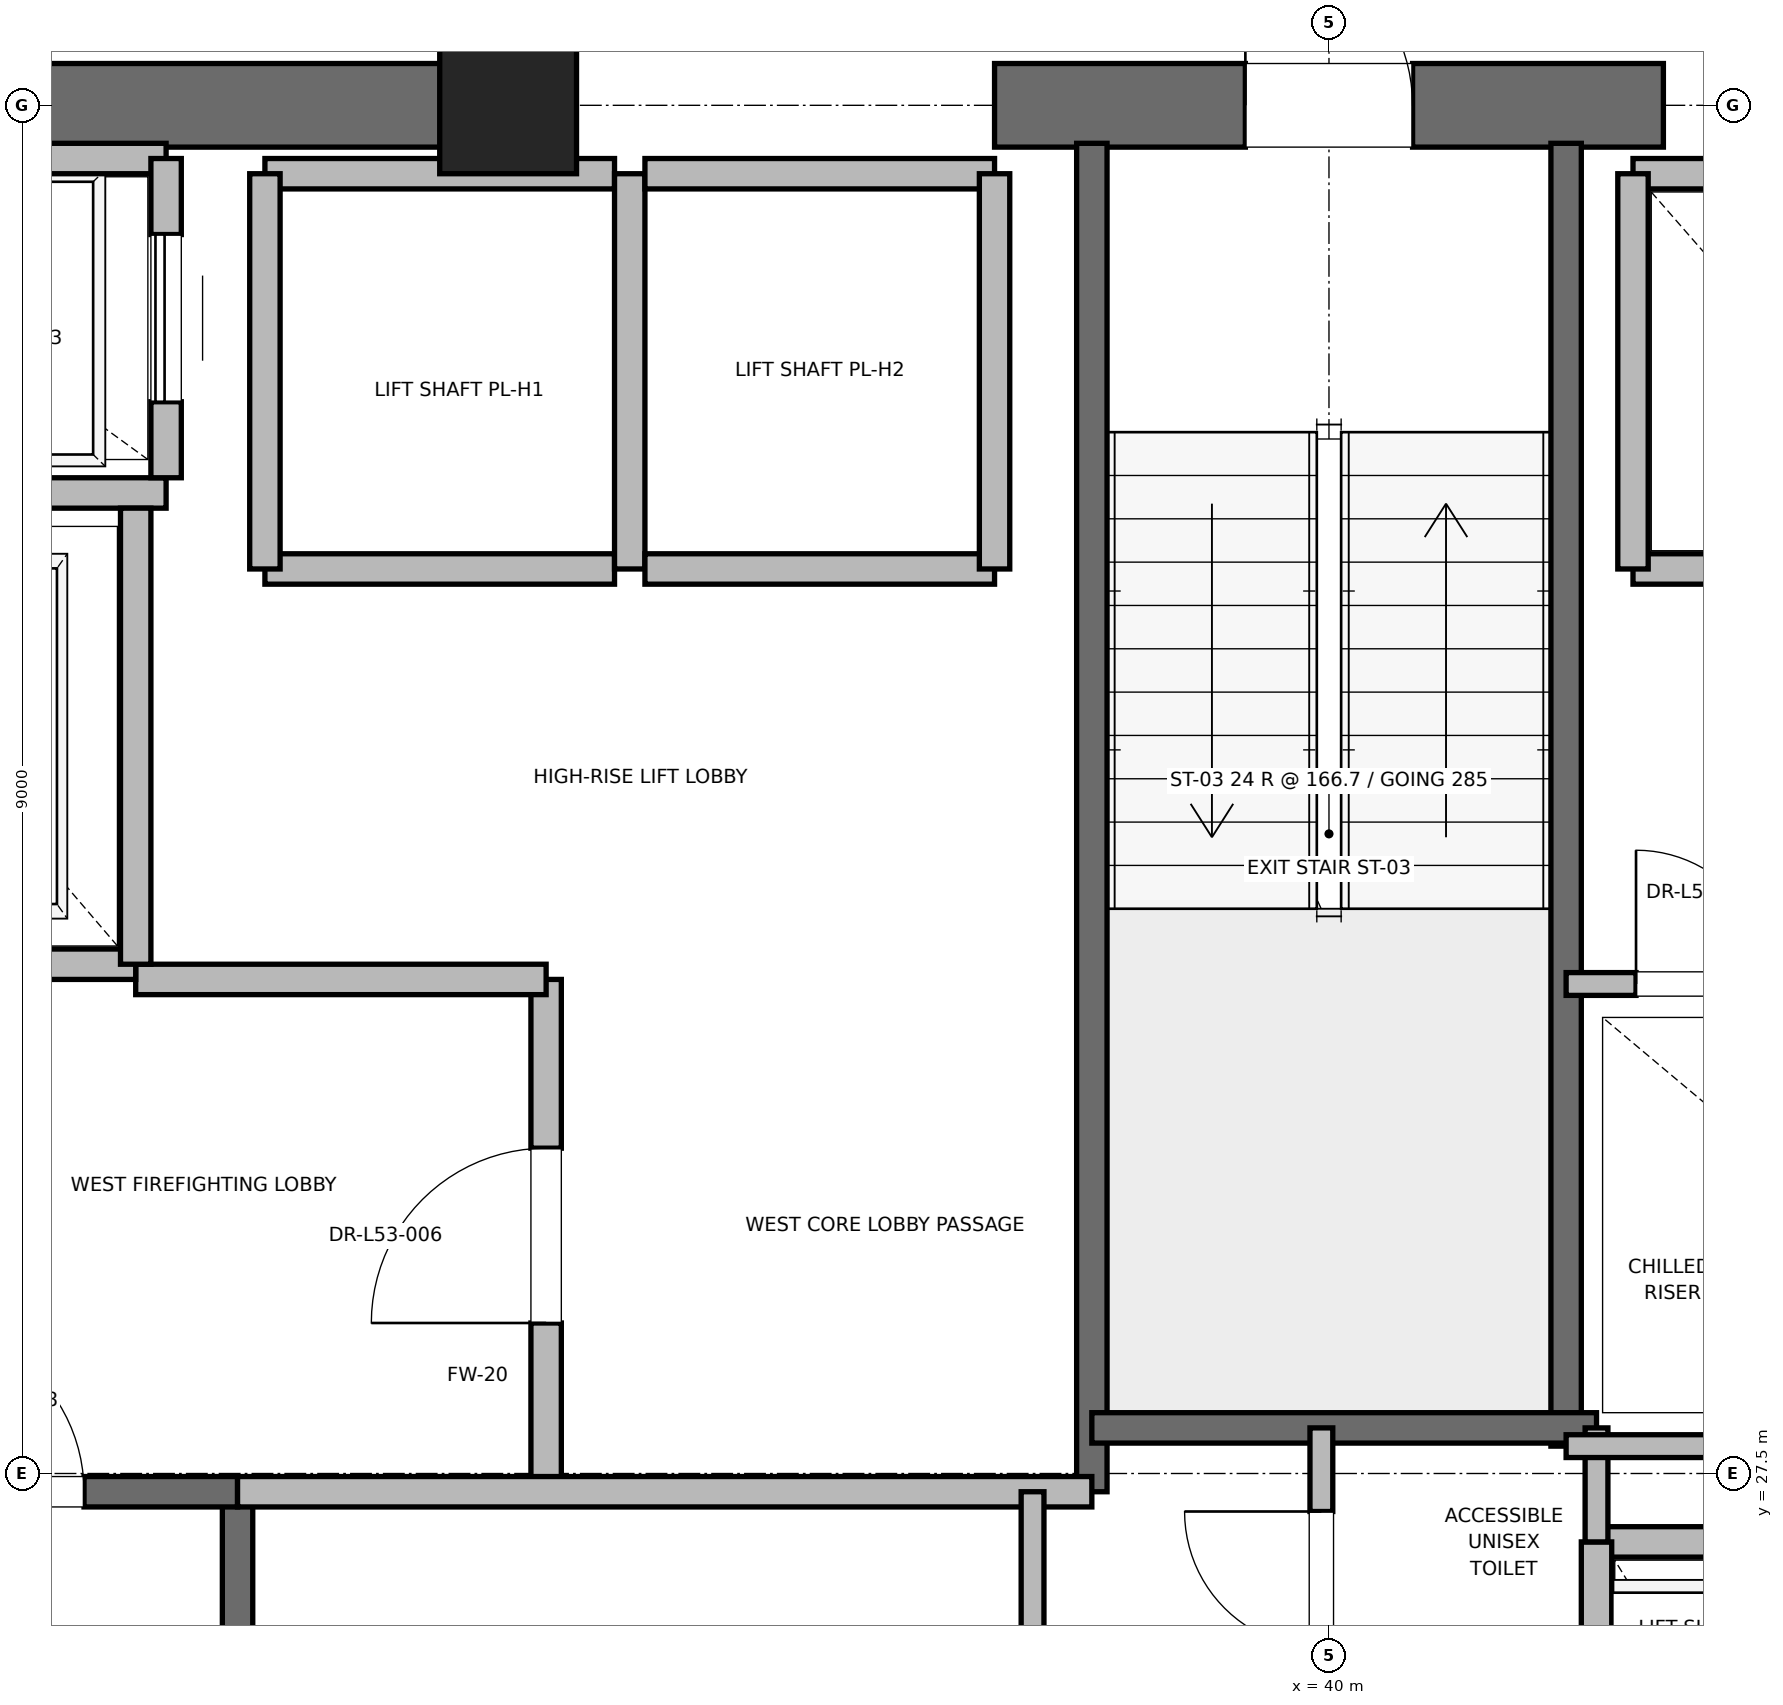
"""IFC4 building model, lengths in metres.
Left out: names, types, materials, properties, quantities, classifications, styles, units other than length and angle.
Written with IfcOpenShell. Run it as: python <this file> out.ifc"""

import sys

from ifc_helpers import new_model, si_unit, direction, frame, frame_2d, origin, origin_2d, place, context, subcontext, project, spatial, rectangle, extrude, element, fill, save


model = new_model("IFC4")
c1 = context("Model", 3, precision=1e-05, world=origin(), true_north=direction((0.0, 1.0)))
c2 = subcontext(c1, "Body", "Model", "MODEL_VIEW")
j1 = project(units=[si_unit("LENGTHUNIT", "METRE"), si_unit("PLANEANGLEUNIT", "RADIAN")], contexts=[c1])
p1 = place(None, origin())
s1 = spatial("IfcSite", under=j1, at=p1, CompositionType="ELEMENT")
p2 = place(p1, origin())
s2 = spatial("IfcBuilding", under=s1, at=p2, CompositionType="ELEMENT")
p3 = place(p2, frame((0.0, 0.0, 229.2)))
s3 = spatial("IfcBuildingStorey", under=s2, at=p3, CompositionType="ELEMENT", Elevation=229.2)
p4 = place(p3, frame((34.6, 36.5, 0.0), z_axis=(0.0, 0.0, 1.0), x_axis=(1.0, 0.0, 0.0)))
e1 = element("IfcColumn", 1, at=p4, inside=s3, PredefinedType="PILASTER", context=c2, shape_type="SweptSolid", body=[
    extrude(rectangle(XDim=0.9, YDim=0.9, at=origin_2d()), origin(), (0.0, 0.0, 1.0), 4.0),
])
p5 = place(p3, frame((29.0, 36.5, 0.0), z_axis=(0.0, 0.0, 1.0), x_axis=(1.0, 0.0, 0.0)))
e2 = element("IfcWall", 2, at=p5, inside=s3, PredefinedType="SHEAR", context=c2, shape_type="SweptSolid", body=[
    extrude(rectangle(XDim=5.8, YDim=0.55, at=frame_2d((2.9, 0.0))), origin(), (0.0, 0.0, 1.0), 3.7),
])
p6 = place(p3, frame((37.8, 36.5, 0.0), z_axis=(0.0, 0.0, 1.0), x_axis=(1.0, 0.0, 0.0)))
e3 = element("IfcWall", 3, at=p6, inside=s3, PredefinedType="SHEAR", context=c2, shape_type="SweptSolid", body=[
    extrude(rectangle(XDim=4.4, YDim=0.55, at=frame_2d((2.2, 0.0))), origin(), (0.0, 0.0, 1.0), 3.7),
])
p7 = place(p6, frame((1.65, 0.0, 0.0)))
e4 = element("IfcOpeningElement", 4, at=p7, cuts=e3, PredefinedType="OPENING", context=c2, shape_type="SweptSolid", body=[
    extrude(rectangle(XDim=1.1, YDim=2.15, at=frame_2d((0.55, 1.075))), frame((0.0, 0.275, 0.0), z_axis=(0.0, -1.0, 0.0), x_axis=(1.0, 0.0, 0.0)), (0.0, 0.0, 1.0), 0.55),
])
p8 = place(p3, frame((32.82, 18.6, 0.0), z_axis=(0.0, 0.0, 1.0), x_axis=(0.0, 1.0, 0.0)))
e5 = element("IfcWall", 5, at=p8, inside=s3, PredefinedType="SOLIDWALL", context=c2, shape_type="SweptSolid", body=[
    extrude(rectangle(XDim=8.78, YDim=0.2, at=frame_2d((4.39, 0.0))), origin(), (0.0, 0.0, 1.0), 3.7),
])
p9 = place(p3, frame((29.7, 27.38, 0.0), z_axis=(0.0, 0.0, 1.0), x_axis=(1.0, 0.0, 0.0)))
e6 = element("IfcWall", 6, at=p9, inside=s3, PredefinedType="SOLIDWALL", context=c2, shape_type="SweptSolid", body=[
    extrude(rectangle(XDim=3.12, YDim=0.2, at=frame_2d((1.56, 0.0))), origin(), (0.0, 0.0, 1.0), 3.7),
])
p10 = place(p9, frame((1.01, 0.0, 0.0)))
e7 = element("IfcOpeningElement", 7, at=p10, cuts=e6, PredefinedType="OPENING", context=c2, shape_type="SweptSolid", body=[
    extrude(rectangle(XDim=1.1, YDim=2.15, at=frame_2d((0.55, 1.075))), frame((0.0, 0.1, 0.0), z_axis=(0.0, -1.0, 0.0), x_axis=(1.0, 0.0, 0.0)), (0.0, 0.0, 1.0), 0.2),
])
p11 = place(p3, frame((38.44, 27.38, 0.0), z_axis=(0.0, 0.0, 1.0), x_axis=(0.0, 1.0, 0.0)))
e8 = element("IfcWall", 8, at=p11, inside=s3, PredefinedType="SOLIDWALL", context=c2, shape_type="SweptSolid", body=[
    extrude(rectangle(XDim=8.87, YDim=0.2, at=frame_2d((4.435, 0.0))), origin(), (0.0, 0.0, 1.0), 3.7),
])
p12 = place(p3, frame((41.56, 27.68, 0.0), z_axis=(0.0, 0.0, 1.0), x_axis=(0.0, 1.0, 0.0)))
e9 = element("IfcWall", 9, at=p12, inside=s3, PredefinedType="SOLIDWALL", context=c2, shape_type="SweptSolid", body=[
    extrude(rectangle(XDim=8.57, YDim=0.2, at=frame_2d((4.285, 0.0))), origin(), (0.0, 0.0, 1.0), 3.7),
])
p13 = place(p3, frame((38.44, 27.8, 0.0), z_axis=(0.0, 0.0, 1.0), x_axis=(1.0, 0.0, 0.0)))
e10 = element("IfcWall", 10, at=p13, inside=s3, PredefinedType="SOLIDWALL", context=c2, shape_type="SweptSolid", body=[
    extrude(rectangle(XDim=3.32, YDim=0.2, at=frame_2d((1.66, 0.0))), origin(), (0.0, 0.0, 1.0), 3.7),
])
p14 = place(p3, frame((34.85, 27.38, 0.0), z_axis=(0.0, 0.0, 1.0), x_axis=(0.0, 1.0, 0.0)))
e11 = element("IfcWall", 11, at=p14, inside=s3, PredefinedType="PARTITIONING", context=c2, shape_type="SweptSolid", body=[
    extrude(rectangle(XDim=3.37, YDim=0.2, at=frame_2d((1.685, 0.0))), origin(), (0.0, 0.0, 1.0), 3.7),
])
p15 = place(p14, frame((1.11, 0.0, 0.0)))
e12 = element("IfcOpeningElement", 12, at=p15, cuts=e11, PredefinedType="OPENING", context=c2, shape_type="SweptSolid", body=[
    extrude(rectangle(XDim=1.15, YDim=2.2, at=frame_2d((0.575, 1.1))), frame((0.0, 0.1, 0.0), z_axis=(0.0, -1.0, 0.0), x_axis=(1.0, 0.0, 0.0)), (0.0, 0.0, 1.0), 0.2),
])
p16 = place(p3, frame((32.82, 27.38, 0.0), z_axis=(0.0, 0.0, 1.0), x_axis=(1.0, 0.0, 0.0)))
e13 = element("IfcWall", 13, at=p16, inside=s3, PredefinedType="PARTITIONING", context=c2, shape_type="SweptSolid", body=[
    extrude(rectangle(XDim=5.62, YDim=0.2, at=frame_2d((2.81, 0.0))), origin(), (0.0, 0.0, 1.0), 3.7),
])
p17 = place(p3, frame((32.15, 30.75, 0.0), z_axis=(0.0, 0.0, 1.0), x_axis=(1.0, 0.0, 0.0)))
e14 = element("IfcWall", 14, at=p17, inside=s3, PredefinedType="PARTITIONING", context=c2, shape_type="SweptSolid", body=[
    extrude(rectangle(XDim=2.7, YDim=0.2, at=frame_2d((1.35, 0.0))), origin(), (0.0, 0.0, 1.0), 3.7),
])
p18 = place(p3, frame((29.55, 30.85, 0.0), z_axis=(0.0, 0.0, 1.0), x_axis=(1.0, 0.0, 0.0)))
e15 = element("IfcWall", 15, at=p18, inside=s3, PredefinedType="SOLIDWALL", context=c2, shape_type="SweptSolid", body=[
    extrude(rectangle(XDim=2.6, YDim=0.2, at=frame_2d((1.3, 0.0))), origin(), (0.0, 0.0, 1.0), 2.68),
])
p19 = place(p18, frame((0.75, 0.0, 0.0)))
e16 = element("IfcOpeningElement", 16, at=p19, cuts=e15, PredefinedType="OPENING", context=c2, shape_type="SweptSolid", body=[
    extrude(rectangle(XDim=1.1, YDim=2.2, at=frame_2d((0.55, 1.1))), frame((0.0, 0.1, 0.0), z_axis=(0.0, -1.0, 0.0), x_axis=(1.0, 0.0, 0.0)), (0.0, 0.0, 1.0), 0.2),
])
p20 = place(p3, frame((29.55, 33.95, 0.0), z_axis=(0.0, 0.0, 1.0), x_axis=(1.0, 0.0, 0.0)))
e17 = element("IfcWall", 17, at=p20, inside=s3, PredefinedType="SOLIDWALL", context=c2, shape_type="SweptSolid", body=[
    extrude(rectangle(XDim=2.8, YDim=0.2, at=frame_2d((1.4, 0.0))), origin(), (0.0, 0.0, 1.0), 3.7),
])
p21 = place(p3, frame((32.15, 30.85, 0.0), z_axis=(0.0, 0.0, 1.0), x_axis=(0.0, 1.0, 0.0)))
e18 = element("IfcWall", 18, at=p21, inside=s3, PredefinedType="SOLIDWALL", context=c2, shape_type="SweptSolid", body=[
    extrude(rectangle(XDim=3.0, YDim=0.2, at=frame_2d((1.5, 0.0))), origin(), (0.0, 0.0, 1.0), 3.7),
])
p22 = place(p3, frame((32.35, 36.15, 0.0), z_axis=(0.0, 0.0, 1.0), x_axis=(-1.0, 0.0, 0.0)))
e19 = element("IfcWall", 19, at=p22, inside=s3, PredefinedType="SOLIDWALL", context=c2, shape_type="SweptSolid", body=[
    extrude(rectangle(XDim=2.8, YDim=0.2, at=frame_2d((1.4, 0.0))), origin(), (0.0, 0.0, 1.0), 2.987),
])
p23 = place(p3, frame((32.35, 34.05, 0.0), z_axis=(0.0, 0.0, 1.0), x_axis=(0.0, 1.0, 0.0)))
e20 = element("IfcWall", 20, at=p23, inside=s3, PredefinedType="SOLIDWALL", context=c2, shape_type="SweptSolid", body=[
    extrude(rectangle(XDim=2.1, YDim=0.2, at=frame_2d((1.05, 0.0))), origin(), (0.0, 0.0, 1.0), 3.7),
])
p24 = place(p23, frame((0.5, 0.0, 0.0)))
e21 = element("IfcOpeningElement", 21, at=p24, cuts=e20, PredefinedType="OPENING", context=c2, shape_type="SweptSolid", body=[
    extrude(rectangle(XDim=1.1, YDim=2.2, at=frame_2d((0.55, 1.1))), frame((0.0, 0.1, 0.0), z_axis=(0.0, -1.0, 0.0), x_axis=(1.0, 0.0, 0.0)), (0.0, 0.0, 1.0), 0.2),
])
p25 = place(p3, frame((43.44, 27.05, 0.0), z_axis=(0.0, 0.0, 1.0), x_axis=(-1.0, 0.0, 0.0)))
e22 = element("IfcWall", 22, at=p25, inside=s3, PredefinedType="SOLIDWALL", context=c2, shape_type="SweptSolid", body=[
    extrude(rectangle(XDim=1.68, YDim=0.2, at=frame_2d((0.84, 0.0))), origin(), (0.0, 0.0, 1.0), 3.7),
])
p26 = place(p3, frame((41.76, 27.05, 0.0), z_axis=(0.0, 0.0, 1.0), x_axis=(0.0, -1.0, 0.0)))
e23 = element("IfcWall", 23, at=p26, inside=s3, PredefinedType="SOLIDWALL", context=c2, shape_type="SweptSolid", body=[
    extrude(rectangle(XDim=2.6, YDim=0.2, at=frame_2d((1.3, 0.0))), origin(), (0.0, 0.0, 1.0), 3.7),
])
p27 = place(p3, frame((33.0, 33.45, 0.0), z_axis=(0.0, 0.0, 1.0), x_axis=(1.0, 0.0, 0.0)))
e24 = element("IfcWall", 24, at=p27, inside=s3, PredefinedType="SOLIDWALL", context=c2, shape_type="SweptSolid", body=[
    extrude(rectangle(XDim=2.3, YDim=0.2, at=frame_2d((1.15, 0.0))), origin(), (0.0, 0.0, 1.0), 3.7),
])
p28 = place(p3, frame((35.3, 36.05, 0.0), z_axis=(0.0, 0.0, 1.0), x_axis=(-1.0, 0.0, 0.0)))
e25 = element("IfcWall", 25, at=p28, inside=s3, PredefinedType="SOLIDWALL", context=c2, shape_type="SweptSolid", body=[
    extrude(rectangle(XDim=2.3, YDim=0.2, at=frame_2d((1.15, 0.0))), origin(), (0.0, 0.0, 1.0), 2.68),
])
p29 = place(p3, frame((33.0, 36.05, 0.0), z_axis=(0.0, 0.0, 1.0), x_axis=(0.0, -1.0, 0.0)))
e26 = element("IfcWall", 26, at=p29, inside=s3, PredefinedType="SOLIDWALL", context=c2, shape_type="SweptSolid", body=[
    extrude(rectangle(XDim=2.6, YDim=0.2, at=frame_2d((1.3, 0.0))), origin(), (0.0, 0.0, 1.0), 3.7),
])
p30 = place(p3, frame((35.4, 33.45, 0.0), z_axis=(0.0, 0.0, 1.0), x_axis=(0.0, 1.0, 0.0)))
e27 = element("IfcWall", 27, at=p30, inside=s3, PredefinedType="SOLIDWALL", context=c2, shape_type="SweptSolid", body=[
    extrude(rectangle(XDim=2.6, YDim=0.2, at=frame_2d((1.3, 0.0))), origin(), (0.0, 0.0, 1.0), 2.68),
])
p31 = place(p3, frame((35.5, 33.45, 0.0), z_axis=(0.0, 0.0, 1.0), x_axis=(1.0, 0.0, 0.0)))
e28 = element("IfcWall", 28, at=p31, inside=s3, PredefinedType="SOLIDWALL", context=c2, shape_type="SweptSolid", body=[
    extrude(rectangle(XDim=2.3, YDim=0.2, at=frame_2d((1.15, 0.0))), origin(), (0.0, 0.0, 1.0), 3.7),
])
p32 = place(p3, frame((37.8, 36.05, 0.0), z_axis=(0.0, 0.0, 1.0), x_axis=(-1.0, 0.0, 0.0)))
e29 = element("IfcWall", 29, at=p32, inside=s3, PredefinedType="SOLIDWALL", context=c2, shape_type="SweptSolid", body=[
    extrude(rectangle(XDim=2.3, YDim=0.2, at=frame_2d((1.15, 0.0))), origin(), (0.0, 0.0, 1.0), 2.68),
])
p33 = place(p3, frame((37.8, 33.45, 0.0), z_axis=(0.0, 0.0, 1.0), x_axis=(0.0, 1.0, 0.0)))
e30 = element("IfcWall", 30, at=p33, inside=s3, PredefinedType="SOLIDWALL", context=c2, shape_type="SweptSolid", body=[
    extrude(rectangle(XDim=2.6, YDim=0.2, at=frame_2d((1.3, 0.0))), origin(), (0.0, 0.0, 1.0), 2.68),
])
p34 = place(p3, frame((42.0, 33.45, 0.0), z_axis=(0.0, 0.0, 1.0), x_axis=(1.0, 0.0, 0.0)))
e31 = element("IfcWall", 31, at=p34, inside=s3, PredefinedType="SOLIDWALL", context=c2, shape_type="SweptSolid", body=[
    extrude(rectangle(XDim=2.3, YDim=0.2, at=frame_2d((1.15, 0.0))), origin(), (0.0, 0.0, 1.0), 3.7),
])
p35 = place(p3, frame((44.3, 36.05, 0.0), z_axis=(0.0, 0.0, 1.0), x_axis=(-1.0, 0.0, 0.0)))
e32 = element("IfcWall", 32, at=p35, inside=s3, PredefinedType="SOLIDWALL", context=c2, shape_type="SweptSolid", body=[
    extrude(rectangle(XDim=2.3, YDim=0.2, at=frame_2d((1.15, 0.0))), origin(), (0.0, 0.0, 1.0), 2.68),
])
p36 = place(p3, frame((42.0, 36.05, 0.0), z_axis=(0.0, 0.0, 1.0), x_axis=(0.0, -1.0, 0.0)))
e33 = element("IfcWall", 33, at=p36, inside=s3, PredefinedType="SOLIDWALL", context=c2, shape_type="SweptSolid", body=[
    extrude(rectangle(XDim=2.6, YDim=0.2, at=frame_2d((1.3, 0.0))), origin(), (0.0, 0.0, 1.0), 2.68),
])
p37 = place(p3, frame((41.76, 27.05, 0.0), z_axis=(0.0, 0.0, 1.0), x_axis=(0.0, 1.0, 0.0)))
e34 = element("IfcWall", 34, at=p37, inside=s3, PredefinedType="PARTITIONING", context=c2, shape_type="SweptSolid", body=[
    extrude(rectangle(XDim=0.75, YDim=0.15, at=frame_2d((0.375, 0.0))), origin(), (0.0, 0.0, 1.0), 2.85),
])
p38 = place(p3, frame((39.95, 25.8, 0.0), z_axis=(0.0, 0.0, 1.0), x_axis=(0.0, 1.0, 0.0)))
e35 = element("IfcWall", 35, at=p38, inside=s3, PredefinedType="PARTITIONING", context=c2, shape_type="SweptSolid", body=[
    extrude(rectangle(XDim=2.0, YDim=0.15, at=frame_2d((1.0, 0.0))), origin(), (0.0, 0.0, 1.0), 2.85),
])
p39 = place(p38, frame((0.55, 0.0, 0.0)))
e36 = element("IfcOpeningElement", 36, at=p39, cuts=e35, PredefinedType="OPENING", context=c2, shape_type="SweptSolid", body=[
    extrude(rectangle(XDim=0.9, YDim=2.1, at=frame_2d((0.45, 1.05))), frame((0.0, 0.075, 0.0), z_axis=(0.0, -1.0, 0.0), x_axis=(1.0, 0.0, 0.0)), (0.0, 0.0, 1.0), 0.15),
])
p40 = place(p3, frame((38.05, 23.06, 0.0), z_axis=(0.0, 0.0, 1.0), x_axis=(0.0, 1.0, 0.0)))
e37 = element("IfcWall", 37, at=p40, inside=s3, PredefinedType="PARTITIONING", context=c2, shape_type="SweptSolid", body=[
    extrude(rectangle(XDim=4.32, YDim=0.15, at=frame_2d((2.16, 0.0))), origin(), (0.0, 0.0, 1.0), 2.85),
])
p41 = place(p40, frame((1.66, 0.0, 0.0)))
e38 = element("IfcOpeningElement", 38, at=p41, cuts=e37, PredefinedType="OPENING", context=c2, shape_type="SweptSolid", body=[
    extrude(rectangle(XDim=1.0, YDim=2.15, at=frame_2d((0.5, 1.075))), frame((0.0, 0.075, 0.0), z_axis=(0.0, -1.0, 0.0), x_axis=(1.0, 0.0, 0.0)), (0.0, 0.0, 1.0), 0.15),
])
p42 = place(p3, frame((41.56, 27.68, 0.0), z_axis=(0.0, 0.0, 1.0), x_axis=(1.0, 0.0, 0.0)))
e39 = element("IfcWall", 39, at=p42, inside=s3, PredefinedType="PARTITIONING", context=c2, shape_type="SweptSolid", body=[
    extrude(rectangle(XDim=3.59, YDim=0.15, at=frame_2d((1.795, 0.0))), origin(), (0.0, 0.0, 1.0), 2.85),
])
p43 = place(p3, frame((41.56, 30.72, 0.0), z_axis=(0.0, 0.0, 1.0), x_axis=(1.0, 0.0, 0.0)))
e40 = element("IfcWall", 40, at=p43, inside=s3, PredefinedType="PARTITIONING", context=c2, shape_type="SweptSolid", body=[
    extrude(rectangle(XDim=1.8, YDim=0.15, at=frame_2d((0.9, 0.0))), origin(), (0.0, 0.0, 1.0), 2.85),
])
p44 = place(p43, frame((0.46, 0.0, 0.0)))
e41 = element("IfcOpeningElement", 41, at=p44, cuts=e40, PredefinedType="OPENING", context=c2, shape_type="SweptSolid", body=[
    extrude(rectangle(XDim=0.88, YDim=2.1, at=frame_2d((0.44, 1.05))), frame((0.0, 0.075, 0.0), z_axis=(0.0, -1.0, 0.0), x_axis=(1.0, 0.0, 0.0)), (0.0, 0.0, 1.0), 0.15),
])
p45 = place(p10, origin())
e42 = element("IfcDoor", 42, at=p45, inside=s3, OperationType="SINGLE_SWING_LEFT", PredefinedType="DOOR", context=c2, shape_type="SweptSolid", body=[
    extrude(rectangle(XDim=1.1, YDim=2.15, at=frame_2d((0.55, 1.075))), frame((0.0, 0.025, 0.0), z_axis=(0.0, -1.0, 0.0), x_axis=(1.0, 0.0, 0.0)), (0.0, 0.0, 1.0), 0.05),
])
fill(e7, e42)
p46 = place(p7, origin())
e43 = element("IfcDoor", 43, at=p46, inside=s3, OperationType="SINGLE_SWING_LEFT", PredefinedType="DOOR", context=c2, shape_type="SweptSolid", body=[
    extrude(rectangle(XDim=1.1, YDim=2.15, at=frame_2d((0.55, 1.075))), frame((0.0, 0.025, 0.0), z_axis=(0.0, -1.0, 0.0), x_axis=(1.0, 0.0, 0.0)), (0.0, 0.0, 1.0), 0.05),
])
fill(e4, e43)
p47 = place(p15, origin())
e44 = element("IfcDoor", 44, at=p47, inside=s3, OperationType="SINGLE_SWING_LEFT", PredefinedType="DOOR", context=c2, shape_type="SweptSolid", body=[
    extrude(rectangle(XDim=1.15, YDim=2.2, at=frame_2d((0.575, 1.1))), frame((0.0, 0.025, 0.0), z_axis=(0.0, -1.0, 0.0), x_axis=(1.0, 0.0, 0.0)), (0.0, 0.0, 1.0), 0.05),
])
fill(e12, e44)
p48 = place(p24, origin())
e45 = element("IfcDoor", 45, at=p48, inside=s3, OperationType="SLIDING_TO_RIGHT", PredefinedType="DOOR", context=c2, shape_type="SweptSolid", body=[
    extrude(rectangle(XDim=1.1, YDim=2.2, at=frame_2d((0.55, 1.1))), frame((0.0, 0.025, 0.0), z_axis=(0.0, -1.0, 0.0), x_axis=(1.0, 0.0, 0.0)), (0.0, 0.0, 1.0), 0.05),
])
fill(e21, e45)
p49 = place(p39, origin())
e46 = element("IfcDoor", 46, at=p49, inside=s3, OperationType="SINGLE_SWING_RIGHT", PredefinedType="DOOR", context=c2, shape_type="SweptSolid", body=[
    extrude(rectangle(XDim=0.9, YDim=2.1, at=frame_2d((0.45, 1.05))), frame((0.0, 0.025, 0.0), z_axis=(0.0, -1.0, 0.0), x_axis=(1.0, 0.0, 0.0)), (0.0, 0.0, 1.0), 0.05),
])
fill(e36, e46)
p50 = place(p44, origin())
e47 = element("IfcDoor", 47, at=p50, inside=s3, OperationType="SINGLE_SWING_LEFT", PredefinedType="DOOR", context=c2, shape_type="SweptSolid", body=[
    extrude(rectangle(XDim=0.88, YDim=2.1, at=frame_2d((0.44, 1.05))), frame((0.0, 0.025, 0.0), z_axis=(0.0, -1.0, 0.0), x_axis=(1.0, 0.0, 0.0)), (0.0, 0.0, 1.0), 0.05),
])
fill(e41, e47)
save(model, sys.argv[1])
